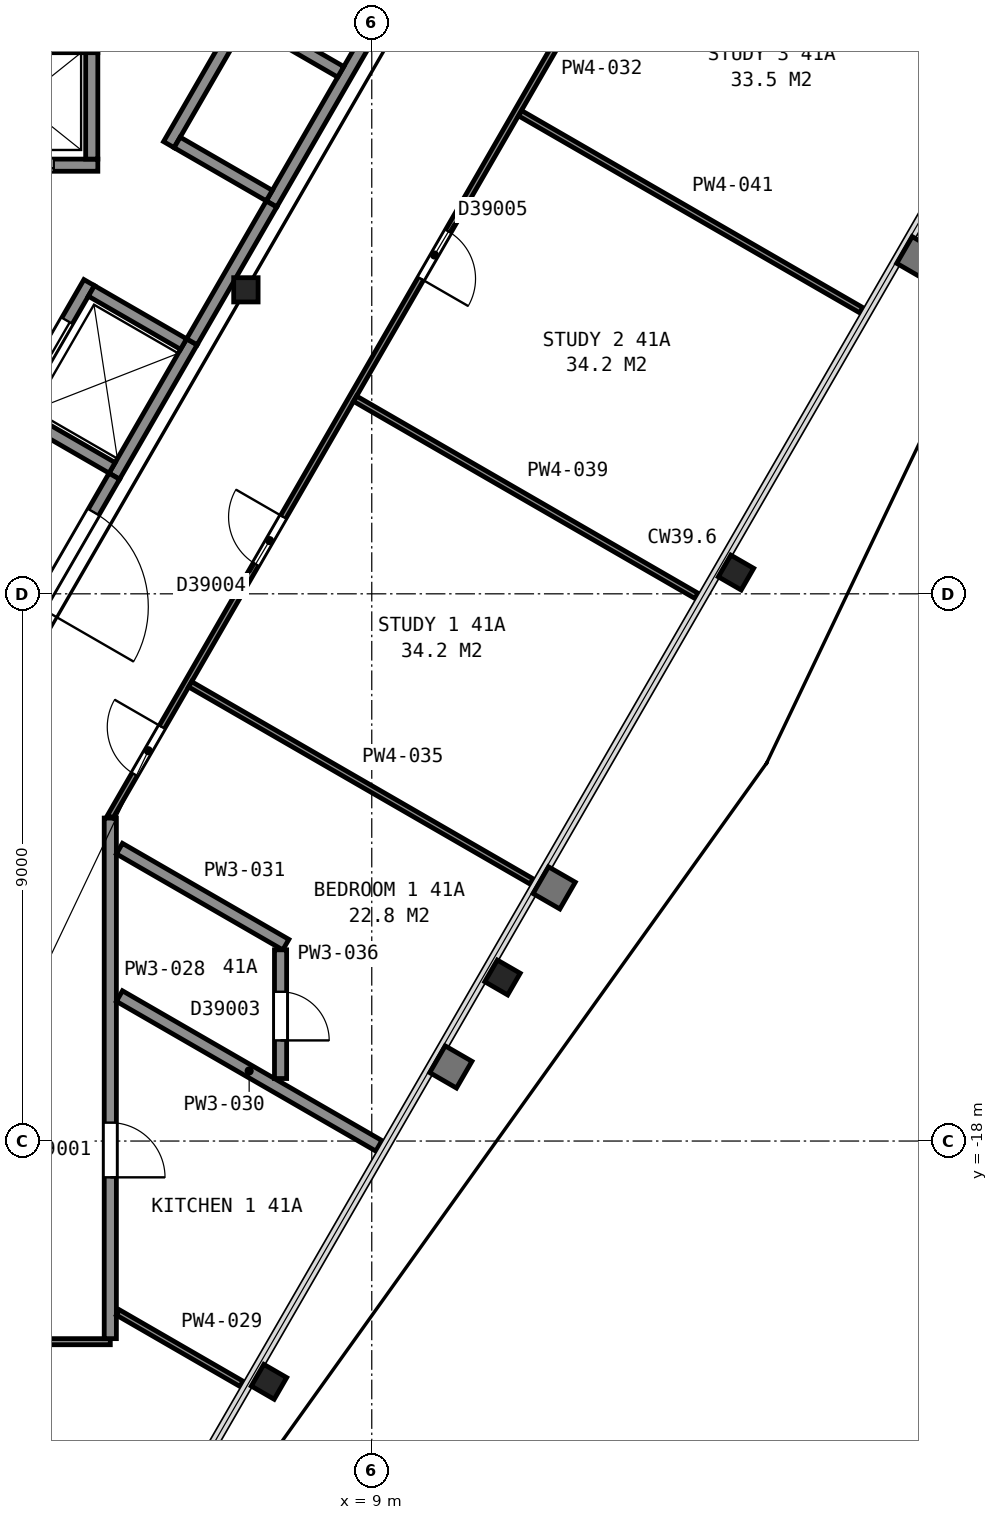
"""IFC4 building model, lengths in metres.
Left out: names, types, materials, properties, quantities, classifications, styles, units other than length and angle.
Written with IfcOpenShell. Run it as: python <this file> out.ifc"""

import sys

from ifc_helpers import new_model, si_unit, direction, frame, frame_2d, origin, origin_2d, place, context, subcontext, project, spatial, rectangle, i_section, extrude, element, fill, save


model = new_model("IFC4")
c1 = context("Model", 3, precision=1e-05, world=origin(), true_north=direction((0.0, 1.0)))
c2 = subcontext(c1, "Body", "Model", "MODEL_VIEW")
j1 = project(units=[si_unit("LENGTHUNIT", "METRE"), si_unit("PLANEANGLEUNIT", "RADIAN")], contexts=[c1])
p1 = place(None, origin())
s1 = spatial("IfcSite", under=j1, at=p1, CompositionType="ELEMENT")
p2 = place(p1, origin())
s2 = spatial("IfcBuilding", under=s1, at=p2, CompositionType="ELEMENT")
p3 = place(p2, frame((0.0, 0.0, 167.3)))
s3 = spatial("IfcBuildingStorey", under=s2, at=p3, CompositionType="ELEMENT", Elevation=167.3)
for number, where, z_axis, x_axis in (
    (1, (7.31, -21.96, 0.0), (0.0, 0.0, 1.0), (-0.5, -0.866, 0.0)),
    (2, (11.15, -15.31, 0.0), (0.0, 0.0, 1.0), (-0.5, -0.866, 0.0)),
    (3, (14.99, -8.65, 0.0), (0.0, 0.0, 1.0), (-0.5, -0.866, 0.0)),
):
    element("IfcColumn", number, at=place(p3, frame(where, z_axis=z_axis, x_axis=x_axis)), inside=s3, PredefinedType="COLUMN", context=c2, shape_type="SweptSolid", body=[
        extrude(i_section(OverallWidth=0.411, OverallDepth=0.434, WebThickness=0.036, FlangeThickness=0.057, FilletRadius=0.015, at=origin_2d()), origin(), (0.0, 0.0, 1.0), 3.7),
    ])
p4 = place(p3, frame((6.93, -4.0, 0.0), z_axis=(0.0, 0.0, 1.0), x_axis=(1.0, 0.0, 0.0)))
e4 = element("IfcColumn", 4, at=p4, inside=s3, PredefinedType="COLUMN", context=c2, shape_type="SweptSolid", body=[
    extrude(i_section(OverallWidth=0.401, OverallDepth=0.399, WebThickness=0.025, FlangeThickness=0.04, FilletRadius=0.015, at=origin_2d()), origin(), (0.0, 0.0, 1.0), 3.7),
])
p5 = place(p3, frame((-0.405, -1.95, 0.0), z_axis=(0.0, 0.0, 1.0), x_axis=(1.0, 0.0, 0.0)))
e5 = element("IfcWall", 5, at=p5, inside=s3, PredefinedType="PARTITIONING", context=c2, shape_type="SweptSolid", body=[
    extrude(rectangle(XDim=4.9, YDim=0.2, at=frame_2d((2.45, 0.0))), origin(), (0.0, 0.0, 1.0), 3.7),
])
p6 = place(p5, frame((0.725, 0.0, 0.0)))
e6 = element("IfcOpeningElement", 6, at=p6, cuts=e5, PredefinedType="OPENING", context=c2, shape_type="SweptSolid", body=[
    extrude(rectangle(XDim=1.1, YDim=2.1, at=frame_2d((0.55, 1.05))), frame((0.0, 0.11, 0.0), z_axis=(0.0, -1.0, 0.0), x_axis=(1.0, 0.0, 0.0)), (0.0, 0.0, 1.0), 0.22),
])
p7 = place(p5, frame((3.075, 0.0, 0.0)))
e7 = element("IfcOpeningElement", 7, at=p7, cuts=e5, PredefinedType="OPENING", context=c2, shape_type="SweptSolid", body=[
    extrude(rectangle(XDim=1.1, YDim=2.1, at=frame_2d((0.55, 1.05))), frame((0.0, 0.11, 0.0), z_axis=(0.0, -1.0, 0.0), x_axis=(1.0, 0.0, 0.0)), (0.0, 0.0, 1.0), 0.22),
])
p8 = place(p3, frame((-2.785, 0.0, 0.0), z_axis=(0.0, 0.0, 1.0), x_axis=(1.0, 0.0, 0.0)))
e8 = element("IfcWall", 8, at=p8, inside=s3, PredefinedType="PARTITIONING", context=c2, shape_type="SweptSolid", body=[
    extrude(rectangle(XDim=7.28, YDim=0.2, at=frame_2d((3.64, 0.0))), origin(), (0.0, 0.0, 1.0), 3.7),
])
p9 = place(p3, frame((4.766, -7.065, 0.0), z_axis=(0.0, 0.0, 1.0), x_axis=(0.499948979701, 0.866054858364, 0.0)))
e9 = element("IfcWall", 9, at=p9, inside=s3, PredefinedType="PARTITIONING", context=c2, shape_type="SweptSolid", body=[
    extrude(rectangle(XDim=2.55, YDim=0.2, at=frame_2d((1.275, 0.0))), origin(), (0.0, 0.0, 1.0), 3.7),
])
p10 = place(p3, frame((7.351, -2.587, 0.0), z_axis=(0.0, 0.0, 1.0), x_axis=(0.500002801628, 0.866023786258, 0.0)))
e10 = element("IfcWall", 10, at=p10, inside=s3, PredefinedType="PARTITIONING", context=c2, shape_type="SweptSolid", body=[
    extrude(rectangle(XDim=4.9, YDim=0.2, at=frame_2d((2.45, 0.0))), origin(), (0.0, 0.0, 1.0), 3.7),
])
p11 = place(p3, frame((3.077, -6.09, 0.0), z_axis=(0.0, 0.0, 1.0), x_axis=(0.500062241894, 0.865989465428, 0.0)))
e11 = element("IfcWall", 11, at=p11, inside=s3, PredefinedType="PARTITIONING", context=c2, shape_type="SweptSolid", body=[
    extrude(rectangle(XDim=2.55, YDim=0.2, at=frame_2d((1.275, 0.0))), origin(), (0.0, 0.0, 1.0), 3.7),
])
p12 = place(p11, frame((0.725, 0.0, 0.0)))
e12 = element("IfcOpeningElement", 12, at=p12, cuts=e11, PredefinedType="OPENING", context=c2, shape_type="SweptSolid", body=[
    extrude(rectangle(XDim=1.1, YDim=2.1, at=frame_2d((0.55, 1.05))), frame((0.0, 0.11, 0.0), z_axis=(0.0, -1.0, 0.0), x_axis=(1.0, 0.0, 0.0)), (0.0, 0.0, 1.0), 0.22),
])
p13 = place(p3, frame((5.663, -1.612, 0.0), z_axis=(0.0, 0.0, 1.0), x_axis=(0.49998122708, 0.866036242063, 0.0)))
e13 = element("IfcWall", 13, at=p13, inside=s3, PredefinedType="PARTITIONING", context=c2, shape_type="SweptSolid", body=[
    extrude(rectangle(XDim=4.9, YDim=0.2, at=frame_2d((2.45, 0.0))), origin(), (0.0, 0.0, 1.0), 3.7),
])
for number, where, z_axis, x_axis in (
    (14, (4.395, -1.85, 0.0), (0.0, 0.0, 1.0), (0.0, 1.0, 0.0)),
    (15, (8.49, -0.416, 0.0), (0.0, 0.0, 1.0), (-0.866, 0.5, 0.0)),
    (16, (7.315, -2.451, 0.0), (0.0, 0.0, 1.0), (-0.866, 0.5, 0.0)),
):
    element("IfcWall", number, at=place(p3, frame(where, z_axis=z_axis, x_axis=x_axis)), inside=s3, PredefinedType="PARTITIONING", context=c2, shape_type="SweptSolid", body=[
        extrude(rectangle(XDim=1.75, YDim=0.2, at=frame_2d((0.875, 0.0))), origin(), (0.0, 0.0, 1.0), 3.7),
    ])
p14 = place(p3, frame((5.905, -4.893, 0.0), z_axis=(0.0, 0.0, 1.0), x_axis=(-0.866002029911, 0.500040482552, 0.0)))
e17 = element("IfcWall", 17, at=p14, inside=s3, PredefinedType="PARTITIONING", context=c2, shape_type="SweptSolid", body=[
    extrude(rectangle(XDim=1.75, YDim=0.2, at=frame_2d((0.875, 0.0))), origin(), (0.0, 0.0, 1.0), 3.7),
])
p15 = place(p3, frame((4.73, -6.928, 0.0), z_axis=(0.0, 0.0, 1.0), x_axis=(-0.866036909293, 0.499980071345, 0.0)))
e18 = element("IfcWall", 18, at=p15, inside=s3, PredefinedType="PARTITIONING", context=c2, shape_type="SweptSolid", body=[
    extrude(rectangle(XDim=1.75, YDim=0.2, at=frame_2d((0.875, 0.0))), origin(), (0.0, 0.0, 1.0), 3.7),
])
p16 = place(p3, frame((1.677, -12.415, 0.0), z_axis=(0.0, 0.0, 1.0), x_axis=(0.500054337157, 0.865994029939, 0.0)))
e19 = element("IfcWall", 19, at=p16, inside=s3, PredefinedType="PARTITIONING", context=c2, shape_type="SweptSolid", body=[
    extrude(rectangle(XDim=6.177, YDim=0.2, at=frame_2d((3.088, 0.0))), origin(), (0.0, 0.0, 1.0), 3.45),
])
p17 = place(p16, frame((3.695, 0.0, 0.0)))
e20 = element("IfcOpeningElement", 20, at=p17, cuts=e19, PredefinedType="OPENING", context=c2, shape_type="SweptSolid", body=[
    extrude(rectangle(XDim=1.8, YDim=2.1, at=frame_2d((0.9, 1.05))), frame((0.0, 0.11, 0.0), z_axis=(0.0, -1.0, 0.0), x_axis=(1.0, 0.0, 0.0)), (0.0, 0.0, 1.0), 0.22),
])
p18 = place(p3, frame((6.042, -4.855, 0.0), z_axis=(0.0, 0.0, 1.0), x_axis=(0.500252727967, 0.865879442048, 0.0)))
e21 = element("IfcWall", 21, at=p18, inside=s3, PredefinedType="PARTITIONING", context=c2, shape_type="SweptSolid", body=[
    extrude(rectangle(XDim=2.617, YDim=0.2, at=frame_2d((1.309, 0.0))), origin(), (0.0, 0.0, 1.0), 3.45),
])
p19 = place(p3, frame((4.7, -21.3, 0.0), z_axis=(0.0, 0.0, 1.0), x_axis=(-1.0, 0.0, 0.0)))
e22 = element("IfcWall", 22, at=p19, inside=s3, PredefinedType="PARTITIONING", context=c2, shape_type="SweptSolid", body=[
    extrude(rectangle(XDim=9.45, YDim=0.1, at=frame_2d((4.725, 0.0))), origin(), (0.0, 0.0, 1.0), 2.713),
])
p20 = place(p19, frame((4.1, 0.0, 0.0)))
e23 = element("IfcOpeningElement", 23, at=p20, cuts=e22, PredefinedType="OPENING", context=c2, shape_type="SweptSolid", body=[
    extrude(rectangle(XDim=1.2, YDim=2.1, at=frame_2d((0.6, 1.05))), frame((0.0, 0.06, 0.0), z_axis=(0.0, -1.0, 0.0), x_axis=(1.0, 0.0, 0.0)), (0.0, 0.0, 1.0), 0.12),
])
p21 = place(p3, frame((4.7, -12.688, 0.0), z_axis=(0.0, 0.0, 1.0), x_axis=(0.0, -1.0, 0.0)))
e24 = element("IfcWall", 24, at=p21, inside=s3, PredefinedType="PARTITIONING", context=c2, shape_type="SweptSolid", body=[
    extrude(rectangle(XDim=8.562, YDim=0.2, at=frame_2d((4.281, 0.0))), origin(), (0.0, 0.0, 1.0), 2.713),
])
p22 = place(p21, frame((5.009, 0.0, 0.0)))
e25 = element("IfcOpeningElement", 25, at=p22, cuts=e24, PredefinedType="OPENING", context=c2, shape_type="SweptSolid", body=[
    extrude(rectangle(XDim=0.9, YDim=2.1, at=frame_2d((0.45, 1.05))), frame((0.0, 0.11, 0.0), z_axis=(0.0, -1.0, 0.0), x_axis=(1.0, 0.0, 0.0)), (0.0, 0.0, 1.0), 0.22),
])
p23 = place(p3, frame((4.825, -20.819, 0.0), z_axis=(0.0, 0.0, 1.0), x_axis=(0.865981189106, -0.500076574252, 0.0)))
e26 = element("IfcWall", 26, at=p23, inside=s3, PredefinedType="PARTITIONING", context=c2, shape_type="SweptSolid", body=[
    extrude(rectangle(XDim=2.347, YDim=0.1, at=frame_2d((1.174, 0.0))), origin(), (0.0, 0.0, 1.0), 2.713),
])
p24 = place(p3, frame((4.85, -15.615, 0.0), z_axis=(0.0, 0.0, 1.0), x_axis=(0.866057699548, -0.499944057923, 0.0)))
e27 = element("IfcWall", 27, at=p24, inside=s3, PredefinedType="PARTITIONING", context=c2, shape_type="SweptSolid", body=[
    extrude(rectangle(XDim=4.927, YDim=0.2, at=frame_2d((2.464, 0.0))), origin(), (0.0, 0.0, 1.0), 2.713),
])
p25 = place(p3, frame((4.85, -13.191, 0.0), z_axis=(0.0, 0.0, 1.0), x_axis=(0.866109679077, -0.499854002494, 0.0)))
e28 = element("IfcWall", 28, at=p25, inside=s3, PredefinedType="PARTITIONING", context=c2, shape_type="SweptSolid", body=[
    extrude(rectangle(XDim=3.16, YDim=0.2, at=frame_2d((1.58, 0.0))), origin(), (0.0, 0.0, 1.0), 2.713),
])
p26 = place(p3, frame((13.342, 2.306, 0.0), z_axis=(0.0, 0.0, 1.0), x_axis=(-0.49997635812, -0.866039053, 0.0)))
e29 = element("IfcWall", 29, at=p26, inside=s3, PredefinedType="PARTITIONING", context=c2, shape_type="SweptSolid", body=[
    extrude(rectangle(XDim=17.285, YDim=0.1, at=frame_2d((8.643, 0.0))), origin(), (0.0, 0.0, 1.0), 2.713),
])
p27 = place(p26, frame((15.585, 0.0, 0.0)))
e30 = element("IfcOpeningElement", 30, at=p27, cuts=e29, PredefinedType="OPENING", context=c2, shape_type="SweptSolid", body=[
    extrude(rectangle(XDim=0.9, YDim=2.1, at=frame_2d((0.45, 1.05))), frame((0.0, 0.06, 0.0), z_axis=(0.0, -1.0, 0.0), x_axis=(1.0, 0.0, 0.0)), (0.0, 0.0, 1.0), 0.12),
])
p28 = place(p26, frame((11.595, 0.0, 0.0)))
e31 = element("IfcOpeningElement", 31, at=p28, cuts=e29, PredefinedType="OPENING", context=c2, shape_type="SweptSolid", body=[
    extrude(rectangle(XDim=0.9, YDim=2.1, at=frame_2d((0.45, 1.05))), frame((0.0, 0.06, 0.0), z_axis=(0.0, -1.0, 0.0), x_axis=(1.0, 0.0, 0.0)), (0.0, 0.0, 1.0), 0.12),
])
p29 = place(p26, frame((6.171, 0.0, 0.0)))
e32 = element("IfcOpeningElement", 32, at=p29, cuts=e29, PredefinedType="OPENING", context=c2, shape_type="SweptSolid", body=[
    extrude(rectangle(XDim=0.9, YDim=2.1, at=frame_2d((0.45, 1.05))), frame((0.0, 0.06, 0.0), z_axis=(0.0, -1.0, 0.0), x_axis=(1.0, 0.0, 0.0)), (0.0, 0.0, 1.0), 0.12),
])
p30 = place(p3, frame((6.013, -10.488, 0.0), z_axis=(0.0, 0.0, 1.0), x_axis=(0.86599118531, -0.500059263454, 0.0)))
e33 = element("IfcWall", 33, at=p30, inside=s3, PredefinedType="PARTITIONING", context=c2, shape_type="SweptSolid", body=[
    extrude(rectangle(XDim=6.484, YDim=0.1, at=frame_2d((3.242, 0.0))), origin(), (0.0, 0.0, 1.0), 2.713),
])
p31 = place(p3, frame((7.5, -16.972, 0.0), z_axis=(0.0, 0.0, 1.0), x_axis=(0.0, 1.0, 0.0)))
e34 = element("IfcWall", 34, at=p31, inside=s3, PredefinedType="PARTITIONING", context=c2, shape_type="SweptSolid", body=[
    extrude(rectangle(XDim=2.117, YDim=0.2, at=frame_2d((1.059, 0.0))), origin(), (0.0, 0.0, 1.0), 2.713),
])
p32 = place(p31, frame((0.627, 0.0, 0.0)))
e35 = element("IfcOpeningElement", 35, at=p32, cuts=e34, PredefinedType="OPENING", context=c2, shape_type="SweptSolid", body=[
    extrude(rectangle(XDim=0.8, YDim=2.1, at=frame_2d((0.4, 1.05))), frame((0.0, 0.11, 0.0), z_axis=(0.0, -1.0, 0.0), x_axis=(1.0, 0.0, 0.0)), (0.0, 0.0, 1.0), 0.22),
])
p33 = place(p3, frame((8.725, -5.791, 0.0), z_axis=(0.0, 0.0, 1.0), x_axis=(0.865998075994, -0.500047330135, 0.0)))
e36 = element("IfcWall", 36, at=p33, inside=s3, PredefinedType="PARTITIONING", context=c2, shape_type="SweptSolid", body=[
    extrude(rectangle(XDim=6.483, YDim=0.1, at=frame_2d((3.242, 0.0))), origin(), (0.0, 0.0, 1.0), 2.713),
])
p34 = place(p3, frame((11.441, -1.096, 0.0), z_axis=(0.0, 0.0, 1.0), x_axis=(0.866019919364, -0.500009499175, 0.0)))
e37 = element("IfcWall", 37, at=p34, inside=s3, PredefinedType="PARTITIONING", context=c2, shape_type="SweptSolid", body=[
    extrude(rectangle(XDim=6.479, YDim=0.1, at=frame_2d((3.239, 0.0))), origin(), (0.0, 0.0, 1.0), 2.713),
])
p35 = place(p7, origin())
e38 = element("IfcDoor", 38, at=p35, inside=s3, OperationType="SLIDING_TO_RIGHT", PredefinedType="DOOR", context=c2, shape_type="SweptSolid", body=[
    extrude(rectangle(XDim=1.1, YDim=2.1, at=frame_2d((0.55, 1.05))), frame((0.0, 0.025, 0.0), z_axis=(0.0, -1.0, 0.0), x_axis=(1.0, 0.0, 0.0)), (0.0, 0.0, 1.0), 0.05),
])
fill(e7, e38)
p36 = place(p12, origin())
e39 = element("IfcDoor", 39, at=p36, inside=s3, OperationType="SLIDING_TO_LEFT", PredefinedType="DOOR", context=c2, shape_type="SweptSolid", body=[
    extrude(rectangle(XDim=1.1, YDim=2.1, at=frame_2d((0.55, 1.05))), frame((0.0, 0.025, 0.0), z_axis=(0.0, -1.0, 0.0), x_axis=(1.0, 0.0, 0.0)), (0.0, 0.0, 1.0), 0.05),
])
fill(e12, e39)
p37 = place(p17, origin())
e40 = element("IfcDoor", 40, at=p37, inside=s3, OperationType="DOUBLE_DOOR_SINGLE_SWING", PredefinedType="DOOR", context=c2, shape_type="SweptSolid", body=[
    extrude(rectangle(XDim=1.8, YDim=2.1, at=frame_2d((0.9, 1.05))), frame((0.0, 0.025, 0.0), z_axis=(0.0, -1.0, 0.0), x_axis=(1.0, 0.0, 0.0)), (0.0, 0.0, 1.0), 0.05),
])
fill(e20, e40)
p38 = place(p22, origin())
e41 = element("IfcDoor", 41, at=p38, inside=s3, OperationType="SINGLE_SWING_RIGHT", PredefinedType="DOOR", context=c2, shape_type="SweptSolid", body=[
    extrude(rectangle(XDim=0.9, YDim=2.1, at=frame_2d((0.45, 1.05))), frame((0.0, 0.025, 0.0), z_axis=(0.0, -1.0, 0.0), x_axis=(1.0, 0.0, 0.0)), (0.0, 0.0, 1.0), 0.05),
])
fill(e25, e41)
p39 = place(p27, origin())
e42 = element("IfcDoor", 42, at=p39, inside=s3, OperationType="SINGLE_SWING_LEFT", PredefinedType="DOOR", context=c2, shape_type="SweptSolid", body=[
    extrude(rectangle(XDim=0.9, YDim=2.1, at=frame_2d((0.45, 1.05))), frame((0.0, 0.025, 0.0), z_axis=(0.0, -1.0, 0.0), x_axis=(1.0, 0.0, 0.0)), (0.0, 0.0, 1.0), 0.05),
])
fill(e30, e42)
p40 = place(p28, origin())
e43 = element("IfcDoor", 43, at=p40, inside=s3, OperationType="SINGLE_SWING_LEFT", PredefinedType="DOOR", context=c2, shape_type="SweptSolid", body=[
    extrude(rectangle(XDim=0.9, YDim=2.1, at=frame_2d((0.45, 1.05))), frame((0.0, 0.025, 0.0), z_axis=(0.0, -1.0, 0.0), x_axis=(1.0, 0.0, 0.0)), (0.0, 0.0, 1.0), 0.05),
])
fill(e31, e43)
p41 = place(p29, origin())
e44 = element("IfcDoor", 44, at=p41, inside=s3, OperationType="SINGLE_SWING_RIGHT", PredefinedType="DOOR", context=c2, shape_type="SweptSolid", body=[
    extrude(rectangle(XDim=0.9, YDim=2.1, at=frame_2d((0.45, 1.05))), frame((0.0, 0.025, 0.0), z_axis=(0.0, -1.0, 0.0), x_axis=(1.0, 0.0, 0.0)), (0.0, 0.0, 1.0), 0.05),
])
fill(e32, e44)
p42 = place(p32, origin())
e45 = element("IfcDoor", 45, at=p42, inside=s3, OperationType="SINGLE_SWING_LEFT", PredefinedType="DOOR", context=c2, shape_type="SweptSolid", body=[
    extrude(rectangle(XDim=0.8, YDim=2.1, at=frame_2d((0.4, 1.05))), frame((0.0, 0.025, 0.0), z_axis=(0.0, -1.0, 0.0), x_axis=(1.0, 0.0, 0.0)), (0.0, 0.0, 1.0), 0.05),
])
fill(e35, e45)
save(model, sys.argv[1])
